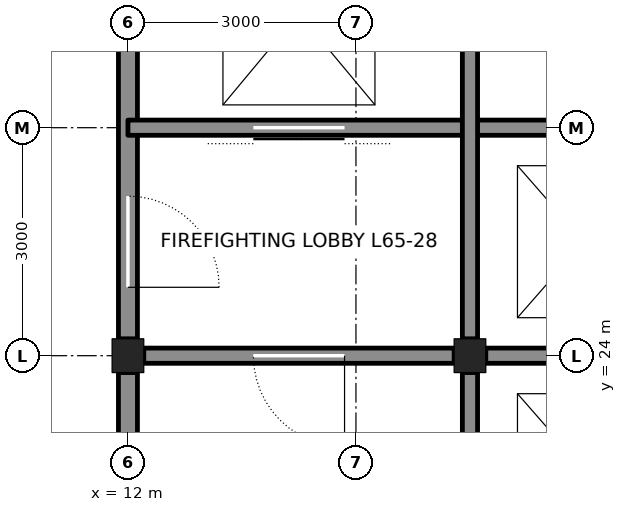
"""IFC4 building model, lengths in metres.
Left out: names, types, materials, properties, quantities, classifications, styles, units other than length and angle.
Written with IfcOpenShell. Run it as: python <this file> out.ifc"""

import sys

from ifc_helpers import new_model, si_unit, direction, frame, frame_2d, origin, origin_2d, place, context, subcontext, project, spatial, rectangle, i_section, extrude, element, fill, save


model = new_model("IFC4")
c1 = context("Model", 3, precision=1e-05, world=origin(), true_north=direction((0.0, 1.0)))
c2 = subcontext(c1, "Body", "Model", "MODEL_VIEW")
j1 = project(units=[si_unit("LENGTHUNIT", "METRE"), si_unit("PLANEANGLEUNIT", "RADIAN")], contexts=[c1])
p1 = place(None, origin())
s1 = spatial("IfcSite", under=j1, at=p1, CompositionType="ELEMENT")
p2 = place(p1, origin())
s2 = spatial("IfcBuilding", under=s1, at=p2, CompositionType="ELEMENT")
p3 = place(p2, frame((0.0, 0.0, 291.6)))
s3 = spatial("IfcBuildingStorey", under=s2, at=p3, CompositionType="ELEMENT", Elevation=291.6)
for number, where, z_axis, x_axis in (
    (1, (12.0, 24.0, 0.0), (0.0, 0.0, 1.0), (1.0, 0.0, 0.0)),
    (2, (16.5, 24.0, 0.0), (0.0, 0.0, 1.0), (1.0, 0.0, 0.0)),
):
    element("IfcColumn", number, at=place(p3, frame(where, z_axis=z_axis, x_axis=x_axis)), inside=s3, PredefinedType="COLUMN", context=c2, shape_type="SweptSolid", body=[
        extrude(i_section(OverallWidth=0.417, OverallDepth=0.445, WebThickness=0.039, FlangeThickness=0.063, at=origin_2d()), origin(), (0.0, 0.0, 1.0), 4.2),
    ])
p4 = place(p3, frame((12.0, 21.222, 0.0), z_axis=(0.0, 0.0, 1.0), x_axis=(0.0, 1.0, 0.0)))
e3 = element("IfcWall", 3, at=p4, inside=s3, PredefinedType="SOLIDWALL", context=c2, shape_type="SweptSolid", body=[
    extrude(rectangle(XDim=2.555, YDim=0.25, at=frame_2d((1.278, 0.0))), origin(), (0.0, 0.0, 1.0), 3.113),
])
p5 = place(p3, frame((12.0, 24.222, 0.0), z_axis=(0.0, 0.0, 1.0), x_axis=(0.0, 1.0, 0.0)))
e4 = element("IfcWall", 4, at=p5, inside=s3, PredefinedType="SOLIDWALL", context=c2, shape_type="SweptSolid", body=[
    extrude(rectangle(XDim=8.528, YDim=0.25, at=frame_2d((4.264, 0.0))), origin(), (0.0, 0.0, 1.0), 3.113),
])
p6 = place(p5, frame((0.678, 0.0, 0.0)))
e5 = element("IfcOpeningElement", 5, at=p6, cuts=e4, PredefinedType="OPENING", context=c2, shape_type="SweptSolid", body=[
    extrude(rectangle(XDim=1.2, YDim=2.1, at=frame_2d((0.6, 1.05))), frame((0.0, 0.135, 0.0), z_axis=(0.0, -1.0, 0.0), x_axis=(1.0, 0.0, 0.0)), (0.0, 0.0, 1.0), 0.27),
])
p7 = place(p5, frame((6.903, 0.0, 0.0)))
e6 = element("IfcOpeningElement", 6, at=p7, cuts=e4, PredefinedType="OPENING", context=c2, shape_type="SweptSolid", body=[
    extrude(rectangle(XDim=0.75, YDim=2.1, at=frame_2d((0.375, 1.05))), frame((0.0, 0.135, 0.0), z_axis=(0.0, -1.0, 0.0), x_axis=(1.0, 0.0, 0.0)), (0.0, 0.0, 1.0), 0.27),
])
p8 = place(p3, frame((12.208, 24.0, 0.0), z_axis=(0.0, 0.0, 1.0), x_axis=(1.0, 0.0, 0.0)))
e7 = element("IfcWall", 7, at=p8, inside=s3, PredefinedType="SOLIDWALL", context=c2, shape_type="SweptSolid", body=[
    extrude(rectangle(XDim=4.083, YDim=0.2, at=frame_2d((2.042, 0.0))), origin(), (0.0, 0.0, 1.0), 3.09),
])
p9 = place(p8, frame((1.442, 0.0, 0.0)))
e8 = element("IfcOpeningElement", 8, at=p9, cuts=e7, PredefinedType="OPENING", context=c2, shape_type="SweptSolid", body=[
    extrude(rectangle(XDim=1.2, YDim=2.1, at=frame_2d((0.6, 1.05))), frame((0.0, 0.11, 0.0), z_axis=(0.0, -1.0, 0.0), x_axis=(1.0, 0.0, 0.0)), (0.0, 0.0, 1.0), 0.22),
])
p10 = place(p3, frame((16.708, 24.0, 0.0), z_axis=(0.0, 0.0, 1.0), x_axis=(1.0, 0.0, 0.0)))
e9 = element("IfcWall", 9, at=p10, inside=s3, PredefinedType="SOLIDWALL", context=c2, shape_type="SweptSolid", body=[
    extrude(rectangle(XDim=2.792, YDim=0.2, at=frame_2d((1.396, 0.0))), origin(), (0.0, 0.0, 1.0), 3.09),
])
p11 = place(p3, frame((12.0, 27.0, 0.0), z_axis=(0.0, 0.0, 1.0), x_axis=(1.0, 0.0, 0.0)))
e10 = element("IfcWall", 10, at=p11, inside=s3, PredefinedType="SOLIDWALL", context=c2, shape_type="SweptSolid", body=[
    extrude(rectangle(XDim=7.5, YDim=0.2, at=frame_2d((3.75, 0.0))), origin(), (0.0, 0.0, 1.0), 4.04),
])
p12 = place(p11, frame((1.65, 0.0, 0.0)))
e11 = element("IfcOpeningElement", 11, at=p12, cuts=e10, PredefinedType="OPENING", context=c2, shape_type="SweptSolid", body=[
    extrude(rectangle(XDim=1.2, YDim=2.1, at=frame_2d((0.6, 1.05))), frame((0.0, 0.11, 0.0), z_axis=(0.0, -1.0, 0.0), x_axis=(1.0, 0.0, 0.0)), (0.0, 0.0, 1.0), 0.22),
])
p13 = place(p3, frame((16.5, 21.222, 0.0), z_axis=(0.0, 0.0, 1.0), x_axis=(0.0, 1.0, 0.0)))
e12 = element("IfcWall", 12, at=p13, inside=s3, PredefinedType="SOLIDWALL", context=c2, shape_type="SweptSolid", body=[
    extrude(rectangle(XDim=2.555, YDim=0.2, at=frame_2d((1.278, 0.0))), origin(), (0.0, 0.0, 1.0), 3.113),
])
p14 = place(p3, frame((16.5, 24.222, 0.0), z_axis=(0.0, 0.0, 1.0), x_axis=(0.0, 1.0, 0.0)))
e13 = element("IfcWall", 13, at=p14, inside=s3, PredefinedType="SOLIDWALL", context=c2, shape_type="SweptSolid", body=[
    extrude(rectangle(XDim=8.555, YDim=0.2, at=frame_2d((4.278, 0.0))), origin(), (0.0, 0.0, 1.0), 3.113),
])
p15 = place(p9, frame((1.2, 0.0, 0.0), z_axis=(0.0, 0.0, 1.0), x_axis=(-1.0, 0.0, 0.0)))
e14 = element("IfcDoor", 14, at=p15, inside=s3, OperationType="SINGLE_SWING_LEFT", PredefinedType="DOOR", context=c2, shape_type="SweptSolid", body=[
    extrude(rectangle(XDim=1.2, YDim=2.1, at=frame_2d((0.6, 1.05))), frame((0.0, 0.025, 0.0), z_axis=(0.0, -1.0, 0.0), x_axis=(1.0, 0.0, 0.0)), (0.0, 0.0, 1.0), 0.05),
])
fill(e8, e14)
p16 = place(p6, frame((1.2, 0.0, 0.0), z_axis=(0.0, 0.0, 1.0), x_axis=(-1.0, 0.0, 0.0)))
e15 = element("IfcDoor", 15, at=p16, inside=s3, OperationType="SINGLE_SWING_RIGHT", PredefinedType="DOOR", context=c2, shape_type="SweptSolid", body=[
    extrude(rectangle(XDim=1.2, YDim=2.1, at=frame_2d((0.6, 1.05))), frame((0.0, 0.025, 0.0), z_axis=(0.0, -1.0, 0.0), x_axis=(1.0, 0.0, 0.0)), (0.0, 0.0, 1.0), 0.05),
])
fill(e5, e15)
p17 = place(p12, origin())
e16 = element("IfcDoor", 16, at=p17, inside=s3, OperationType="DOUBLE_DOOR_SLIDING", PredefinedType="DOOR", context=c2, shape_type="SweptSolid", body=[
    extrude(rectangle(XDim=1.2, YDim=2.1, at=frame_2d((0.6, 1.05))), frame((0.0, 0.025, 0.0), z_axis=(0.0, -1.0, 0.0), x_axis=(1.0, 0.0, 0.0)), (0.0, 0.0, 1.0), 0.05),
])
fill(e11, e16)
save(model, sys.argv[1])
